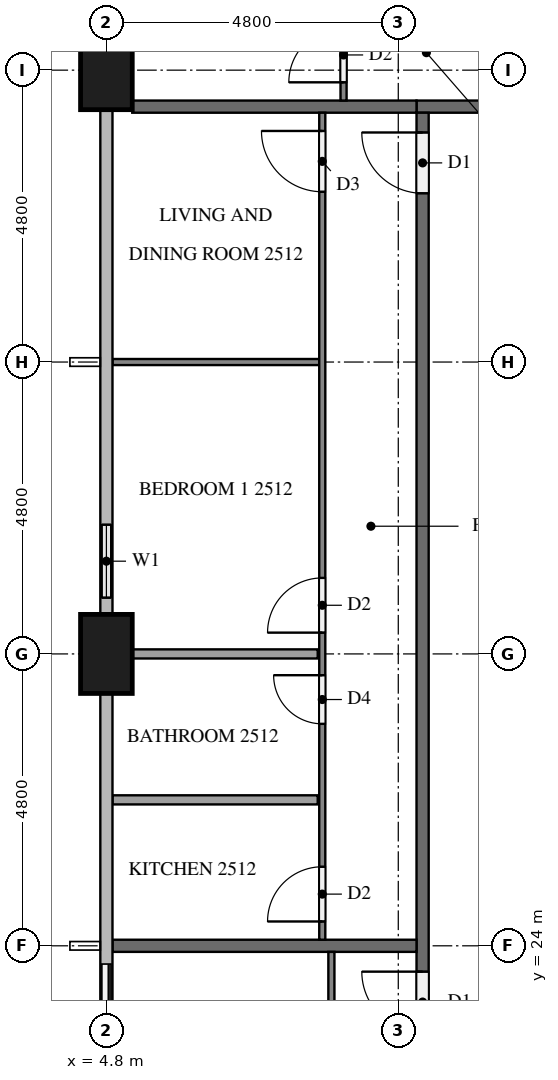
"""IFC4 building model, lengths in metres.
Left out: names, types, materials, properties, quantities, classifications, styles, units other than length and angle.
Written with IfcOpenShell. Run it as: python <this file> out.ifc"""

import sys

from ifc_helpers import new_model, si_unit, direction, frame, frame_2d, origin, origin_2d, place, context, subcontext, project, spatial, rectangle, extrude, element, fill, save


model = new_model("IFC4")
c1 = context("Model", 3, precision=1e-05, world=origin(), true_north=direction((0.0, 1.0)))
c2 = subcontext(c1, "Body", "Model", "MODEL_VIEW")
j1 = project(units=[si_unit("LENGTHUNIT", "METRE"), si_unit("PLANEANGLEUNIT", "RADIAN")], contexts=[c1])
p1 = place(None, origin())
s1 = spatial("IfcSite", under=j1, at=p1, CompositionType="ELEMENT")
p2 = place(p1, origin())
s2 = spatial("IfcBuilding", under=s1, at=p2, CompositionType="ELEMENT")
p3 = place(p2, frame((0.0, 0.0, 99.7)))
s3 = spatial("IfcBuildingStorey", under=s2, at=p3, CompositionType="ELEMENT", Elevation=99.7)
for number, where, z_axis, x_axis in (
    (1, (4.8, 38.4, 0.0), (0.0, 0.0, 1.0), (0.0, 1.0, 0.0)),
    (2, (4.8, 28.8, 0.0), (0.0, 0.0, 1.0), (0.0, 1.0, 0.0)),
):
    element("IfcColumn", number, at=place(p3, frame(where, z_axis=z_axis, x_axis=x_axis)), inside=s3, PredefinedType="COLUMN", context=c2, shape_type="SweptSolid", body=[
        extrude(rectangle(XDim=1.3, YDim=0.85, at=origin_2d()), origin(), (0.0, 0.0, 1.0), 3.2),
    ])
p4 = place(p3, frame((4.8, 31.2, 0.0), z_axis=(0.0, 0.0, 1.0), x_axis=(0.0, -1.0, 0.0)))
e3 = element("IfcWall", 3, at=p4, inside=s3, PredefinedType="SOLIDWALL", context=c2, shape_type="SweptSolid", body=[
    extrude(rectangle(XDim=1.75, YDim=0.15, at=frame_2d((0.875, 0.0))), origin(), (0.0, 0.0, 1.0), 3.2),
])
p5 = place(p4, frame((0.275, 0.0, 0.9)))
e4 = element("IfcOpeningElement", 4, at=p5, cuts=e3, PredefinedType="OPENING", context=c2, shape_type="SweptSolid", body=[
    extrude(rectangle(XDim=1.2, YDim=1.4, at=frame_2d((0.6, 0.7))), frame((0.0, 0.085, 0.0), z_axis=(0.0, -1.0, 0.0), x_axis=(1.0, 0.0, 0.0)), (0.0, 0.0, 1.0), 0.17),
])
p6 = place(p3, frame((4.8, 24.0, 0.0), z_axis=(0.0, 0.0, 1.0), x_axis=(0.0, -1.0, 0.0)))
e5 = element("IfcWall", 5, at=p6, inside=s3, PredefinedType="SOLIDWALL", context=c2, shape_type="SweptSolid", body=[
    extrude(rectangle(XDim=2.4, YDim=0.15, at=frame_2d((1.2, 0.0))), origin(), (0.0, 0.0, 1.0), 3.2),
])
p7 = place(p6, frame((0.3, 0.0, 0.0)))
e6 = element("IfcOpeningElement", 6, at=p7, cuts=e5, PredefinedType="OPENING", context=c2, shape_type="SweptSolid", body=[
    extrude(rectangle(XDim=1.8, YDim=2.4, at=frame_2d((0.9, 1.2))), frame((0.0, 0.085, 0.0), z_axis=(0.0, -1.0, 0.0), x_axis=(1.0, 0.0, 0.0)), (0.0, 0.0, 1.0), 0.17),
])
p8 = place(p3, frame((12.1, 37.8, 0.0), z_axis=(0.0, 0.0, 1.0), x_axis=(-1.0, 0.0, 0.0)))
e7 = element("IfcWall", 7, at=p8, inside=s3, PredefinedType="PARTITIONING", context=c2, shape_type="SweptSolid", body=[
    extrude(rectangle(XDim=2.2, YDim=0.2, at=frame_2d((1.1, 0.0))), origin(), (0.0, 0.0, 1.0), 3.2),
])
p9 = place(p3, frame((10.0, 15.1, 0.0), z_axis=(0.0, 0.0, 1.0), x_axis=(0.0, 1.0, 0.0)))
e8 = element("IfcWall", 8, at=p9, inside=s3, PredefinedType="PARTITIONING", context=c2, shape_type="SweptSolid", body=[
    extrude(rectangle(XDim=22.6, YDim=0.2, at=frame_2d((11.3, 0.0))), origin(), (0.0, 0.0, 1.0), 3.2),
])
p10 = place(p9, frame((21.275, 0.0, 0.0)))
e9 = element("IfcOpeningElement", 9, at=p10, cuts=e8, PredefinedType="OPENING", context=c2, shape_type="SweptSolid", body=[
    extrude(rectangle(XDim=1.0, YDim=2.1, at=frame_2d((0.5, 1.05))), frame((0.0, 0.11, 0.0), z_axis=(0.0, -1.0, 0.0), x_axis=(1.0, 0.0, 0.0)), (0.0, 0.0, 1.0), 0.22),
])
p11 = place(p9, frame((7.475, 0.0, 0.0)))
e10 = element("IfcOpeningElement", 10, at=p11, cuts=e8, PredefinedType="OPENING", context=c2, shape_type="SweptSolid", body=[
    extrude(rectangle(XDim=1.0, YDim=2.1, at=frame_2d((0.5, 1.05))), frame((0.0, 0.11, 0.0), z_axis=(0.0, -1.0, 0.0), x_axis=(1.0, 0.0, 0.0)), (0.0, 0.0, 1.0), 0.22),
])
p12 = place(p3, frame((5.225, 37.8, 0.0), z_axis=(0.0, 0.0, 1.0), x_axis=(1.0, 0.0, 0.0)))
e11 = element("IfcWall", 11, at=p12, inside=s3, PredefinedType="PARTITIONING", context=c2, shape_type="SweptSolid", body=[
    extrude(rectangle(XDim=4.675, YDim=0.2, at=frame_2d((2.337, 0.0))), origin(), (0.0, 0.0, 1.0), 3.2),
])
p13 = place(p3, frame((4.9, 24.0, 0.0), z_axis=(0.0, 0.0, 1.0), x_axis=(1.0, 0.0, 0.0)))
e12 = element("IfcWall", 12, at=p13, inside=s3, PredefinedType="PARTITIONING", context=c2, shape_type="SweptSolid", body=[
    extrude(rectangle(XDim=5.0, YDim=0.2, at=frame_2d((2.5, 0.0))), origin(), (0.0, 0.0, 1.0), 3.2),
])
p14 = place(p3, frame((8.7, 37.9, 0.0), z_axis=(0.0, 0.0, 1.0), x_axis=(0.0, 1.0, 0.0)))
e13 = element("IfcWall", 13, at=p14, inside=s3, PredefinedType="PARTITIONING", context=c2, shape_type="SweptSolid", body=[
    extrude(rectangle(XDim=14.559, YDim=0.1, at=frame_2d((7.279, 0.0))), origin(), (0.0, 0.0, 1.0), 3.2),
])
p15 = place(p14, frame((0.3, 0.0, 0.0)))
e14 = element("IfcOpeningElement", 14, at=p15, cuts=e13, PredefinedType="OPENING", context=c2, shape_type="SweptSolid", body=[
    extrude(rectangle(XDim=0.9, YDim=2.1, at=frame_2d((0.45, 1.05))), frame((0.0, 0.06, 0.0), z_axis=(0.0, -1.0, 0.0), x_axis=(1.0, 0.0, 0.0)), (0.0, 0.0, 1.0), 0.12),
])
p16 = place(p14, frame((8.85, 0.0, 0.0)))
e15 = element("IfcOpeningElement", 15, at=p16, cuts=e13, PredefinedType="OPENING", context=c2, shape_type="SweptSolid", body=[
    extrude(rectangle(XDim=0.9, YDim=2.1, at=frame_2d((0.45, 1.05))), frame((0.0, 0.06, 0.0), z_axis=(0.0, -1.0, 0.0), x_axis=(1.0, 0.0, 0.0)), (0.0, 0.0, 1.0), 0.12),
])
p17 = place(p14, frame((10.45, 0.0, 0.0)))
e16 = element("IfcOpeningElement", 16, at=p17, cuts=e13, PredefinedType="OPENING", context=c2, shape_type="SweptSolid", body=[
    extrude(rectangle(XDim=1.0, YDim=2.1, at=frame_2d((0.5, 1.05))), frame((0.0, 0.06, 0.0), z_axis=(0.0, -1.0, 0.0), x_axis=(1.0, 0.0, 0.0)), (0.0, 0.0, 1.0), 0.12),
])
p18 = place(p3, frame((8.3, 33.6, 0.0), z_axis=(0.0, 0.0, 1.0), x_axis=(-1.0, 0.0, 0.0)))
e17 = element("IfcWall", 17, at=p18, inside=s3, PredefinedType="PARTITIONING", context=c2, shape_type="SweptSolid", body=[
    extrude(rectangle(XDim=3.4, YDim=0.1, at=frame_2d((1.7, 0.0))), origin(), (0.0, 0.0, 1.0), 3.2),
])
p19 = place(p3, frame((8.275, 28.8, 0.0), z_axis=(0.0, 0.0, 1.0), x_axis=(-1.0, 0.0, 0.0)))
e18 = element("IfcWall", 18, at=p19, inside=s3, PredefinedType="PARTITIONING", context=c2, shape_type="SweptSolid", body=[
    extrude(rectangle(XDim=3.05, YDim=0.15, at=frame_2d((1.525, 0.0))), origin(), (0.0, 0.0, 1.0), 3.2),
])
p20 = place(p3, frame((8.275, 26.4, 0.0), z_axis=(0.0, 0.0, 1.0), x_axis=(-1.0, 0.0, 0.0)))
e19 = element("IfcWall", 19, at=p20, inside=s3, PredefinedType="PARTITIONING", context=c2, shape_type="SweptSolid", body=[
    extrude(rectangle(XDim=3.375, YDim=0.15, at=frame_2d((1.688, 0.0))), origin(), (0.0, 0.0, 1.0), 3.2),
])
p21 = place(p3, frame((8.35, 24.1, 0.0), z_axis=(0.0, 0.0, 1.0), x_axis=(0.0, 1.0, 0.0)))
e20 = element("IfcWall", 20, at=p21, inside=s3, PredefinedType="PARTITIONING", context=c2, shape_type="SweptSolid", body=[
    extrude(rectangle(XDim=13.6, YDim=0.1, at=frame_2d((6.8, 0.0))), origin(), (0.0, 0.0, 1.0), 3.2),
])
p22 = place(p21, frame((12.3, 0.0, 0.0)))
e21 = element("IfcOpeningElement", 21, at=p22, cuts=e20, PredefinedType="OPENING", context=c2, shape_type="SweptSolid", body=[
    extrude(rectangle(XDim=1.0, YDim=2.1, at=frame_2d((0.5, 1.05))), frame((0.0, 0.06, 0.0), z_axis=(0.0, -1.0, 0.0), x_axis=(1.0, 0.0, 0.0)), (0.0, 0.0, 1.0), 0.12),
])
p23 = place(p21, frame((5.05, 0.0, 0.0)))
e22 = element("IfcOpeningElement", 22, at=p23, cuts=e20, PredefinedType="OPENING", context=c2, shape_type="SweptSolid", body=[
    extrude(rectangle(XDim=0.9, YDim=2.1, at=frame_2d((0.45, 1.05))), frame((0.0, 0.06, 0.0), z_axis=(0.0, -1.0, 0.0), x_axis=(1.0, 0.0, 0.0)), (0.0, 0.0, 1.0), 0.12),
])
p24 = place(p21, frame((3.55, 0.0, 0.0)))
e23 = element("IfcOpeningElement", 23, at=p24, cuts=e20, PredefinedType="OPENING", context=c2, shape_type="SweptSolid", body=[
    extrude(rectangle(XDim=0.8, YDim=2.1, at=frame_2d((0.4, 1.05))), frame((0.0, 0.06, 0.0), z_axis=(0.0, -1.0, 0.0), x_axis=(1.0, 0.0, 0.0)), (0.0, 0.0, 1.0), 0.12),
])
p25 = place(p21, frame((0.3, 0.0, 0.0)))
e24 = element("IfcOpeningElement", 24, at=p25, cuts=e20, PredefinedType="OPENING", context=c2, shape_type="SweptSolid", body=[
    extrude(rectangle(XDim=0.9, YDim=2.1, at=frame_2d((0.45, 1.05))), frame((0.0, 0.06, 0.0), z_axis=(0.0, -1.0, 0.0), x_axis=(1.0, 0.0, 0.0)), (0.0, 0.0, 1.0), 0.12),
])
p26 = place(p3, frame((8.5, 15.1, 0.0), z_axis=(0.0, 0.0, 1.0), x_axis=(0.0, 1.0, 0.0)))
e25 = element("IfcWall", 25, at=p26, inside=s3, PredefinedType="PARTITIONING", context=c2, shape_type="SweptSolid", body=[
    extrude(rectangle(XDim=8.8, YDim=0.1, at=frame_2d((4.4, 0.0))), origin(), (0.0, 0.0, 1.0), 3.2),
])
p27 = place(p26, frame((4.45, 0.0, 0.0)))
e26 = element("IfcOpeningElement", 26, at=p27, cuts=e25, PredefinedType="OPENING", context=c2, shape_type="SweptSolid", body=[
    extrude(rectangle(XDim=1.0, YDim=2.1, at=frame_2d((0.5, 1.05))), frame((0.0, 0.06, 0.0), z_axis=(0.0, -1.0, 0.0), x_axis=(1.0, 0.0, 0.0)), (0.0, 0.0, 1.0), 0.12),
])
p28 = place(p26, frame((2.95, 0.0, 0.0)))
e27 = element("IfcOpeningElement", 27, at=p28, cuts=e25, PredefinedType="OPENING", context=c2, shape_type="SweptSolid", body=[
    extrude(rectangle(XDim=0.8, YDim=2.1, at=frame_2d((0.4, 1.05))), frame((0.0, 0.06, 0.0), z_axis=(0.0, -1.0, 0.0), x_axis=(1.0, 0.0, 0.0)), (0.0, 0.0, 1.0), 0.12),
])
p29 = place(p26, frame((0.3, 0.0, 0.0)))
e28 = element("IfcOpeningElement", 28, at=p29, cuts=e25, PredefinedType="OPENING", context=c2, shape_type="SweptSolid", body=[
    extrude(rectangle(XDim=0.9, YDim=2.1, at=frame_2d((0.45, 1.05))), frame((0.0, 0.06, 0.0), z_axis=(0.0, -1.0, 0.0), x_axis=(1.0, 0.0, 0.0)), (0.0, 0.0, 1.0), 0.12),
])
p30 = place(p5, origin())
e29 = element("IfcWindow", 29, at=p30, inside=s3, PartitioningType="SINGLE_PANEL", PredefinedType="WINDOW", context=c2, shape_type="SweptSolid", body=[
    extrude(rectangle(XDim=1.2, YDim=1.4, at=frame_2d((0.6, 0.7))), frame((0.0, 0.03, 0.0), z_axis=(0.0, -1.0, 0.0), x_axis=(1.0, 0.0, 0.0)), (0.0, 0.0, 1.0), 0.06),
])
fill(e4, e29)
p31 = place(p7, origin())
e30 = element("IfcDoor", 30, at=p31, inside=s3, OperationType="SLIDING_TO_LEFT", PredefinedType="DOOR", context=c2, shape_type="SweptSolid", body=[
    extrude(rectangle(XDim=1.8, YDim=2.4, at=frame_2d((0.9, 1.2))), frame((0.0, 0.025, 0.0), z_axis=(0.0, -1.0, 0.0), x_axis=(1.0, 0.0, 0.0)), (0.0, 0.0, 1.0), 0.05),
])
fill(e6, e30)
p32 = place(p10, origin())
e31 = element("IfcDoor", 31, at=p32, inside=s3, OperationType="SINGLE_SWING_RIGHT", PredefinedType="DOOR", context=c2, shape_type="SweptSolid", body=[
    extrude(rectangle(XDim=1.0, YDim=2.1, at=frame_2d((0.5, 1.05))), frame((0.0, 0.025, 0.0), z_axis=(0.0, -1.0, 0.0), x_axis=(1.0, 0.0, 0.0)), (0.0, 0.0, 1.0), 0.05),
])
fill(e9, e31)
p33 = place(p11, origin())
e32 = element("IfcDoor", 32, at=p33, inside=s3, OperationType="SINGLE_SWING_RIGHT", PredefinedType="DOOR", context=c2, shape_type="SweptSolid", body=[
    extrude(rectangle(XDim=1.0, YDim=2.1, at=frame_2d((0.5, 1.05))), frame((0.0, 0.025, 0.0), z_axis=(0.0, -1.0, 0.0), x_axis=(1.0, 0.0, 0.0)), (0.0, 0.0, 1.0), 0.05),
])
fill(e10, e32)
p34 = place(p15, origin())
e33 = element("IfcDoor", 33, at=p34, inside=s3, OperationType="SINGLE_SWING_LEFT", PredefinedType="DOOR", context=c2, shape_type="SweptSolid", body=[
    extrude(rectangle(XDim=0.9, YDim=2.1, at=frame_2d((0.45, 1.05))), frame((0.0, 0.025, 0.0), z_axis=(0.0, -1.0, 0.0), x_axis=(1.0, 0.0, 0.0)), (0.0, 0.0, 1.0), 0.05),
])
fill(e14, e33)
p35 = place(p22, origin())
e34 = element("IfcDoor", 34, at=p35, inside=s3, OperationType="SINGLE_SWING_RIGHT", PredefinedType="DOOR", context=c2, shape_type="SweptSolid", body=[
    extrude(rectangle(XDim=1.0, YDim=2.1, at=frame_2d((0.5, 1.05))), frame((0.0, 0.025, 0.0), z_axis=(0.0, -1.0, 0.0), x_axis=(1.0, 0.0, 0.0)), (0.0, 0.0, 1.0), 0.05),
])
fill(e21, e34)
p36 = place(p23, origin())
e35 = element("IfcDoor", 35, at=p36, inside=s3, OperationType="SINGLE_SWING_LEFT", PredefinedType="DOOR", context=c2, shape_type="SweptSolid", body=[
    extrude(rectangle(XDim=0.9, YDim=2.1, at=frame_2d((0.45, 1.05))), frame((0.0, 0.025, 0.0), z_axis=(0.0, -1.0, 0.0), x_axis=(1.0, 0.0, 0.0)), (0.0, 0.0, 1.0), 0.05),
])
fill(e22, e35)
p37 = place(p24, origin())
e36 = element("IfcDoor", 36, at=p37, inside=s3, OperationType="SINGLE_SWING_RIGHT", PredefinedType="DOOR", context=c2, shape_type="SweptSolid", body=[
    extrude(rectangle(XDim=0.8, YDim=2.1, at=frame_2d((0.4, 1.05))), frame((0.0, 0.025, 0.0), z_axis=(0.0, -1.0, 0.0), x_axis=(1.0, 0.0, 0.0)), (0.0, 0.0, 1.0), 0.05),
])
fill(e23, e36)
p38 = place(p25, origin())
e37 = element("IfcDoor", 37, at=p38, inside=s3, OperationType="SINGLE_SWING_LEFT", PredefinedType="DOOR", context=c2, shape_type="SweptSolid", body=[
    extrude(rectangle(XDim=0.9, YDim=2.1, at=frame_2d((0.45, 1.05))), frame((0.0, 0.025, 0.0), z_axis=(0.0, -1.0, 0.0), x_axis=(1.0, 0.0, 0.0)), (0.0, 0.0, 1.0), 0.05),
])
fill(e24, e37)
save(model, sys.argv[1])
